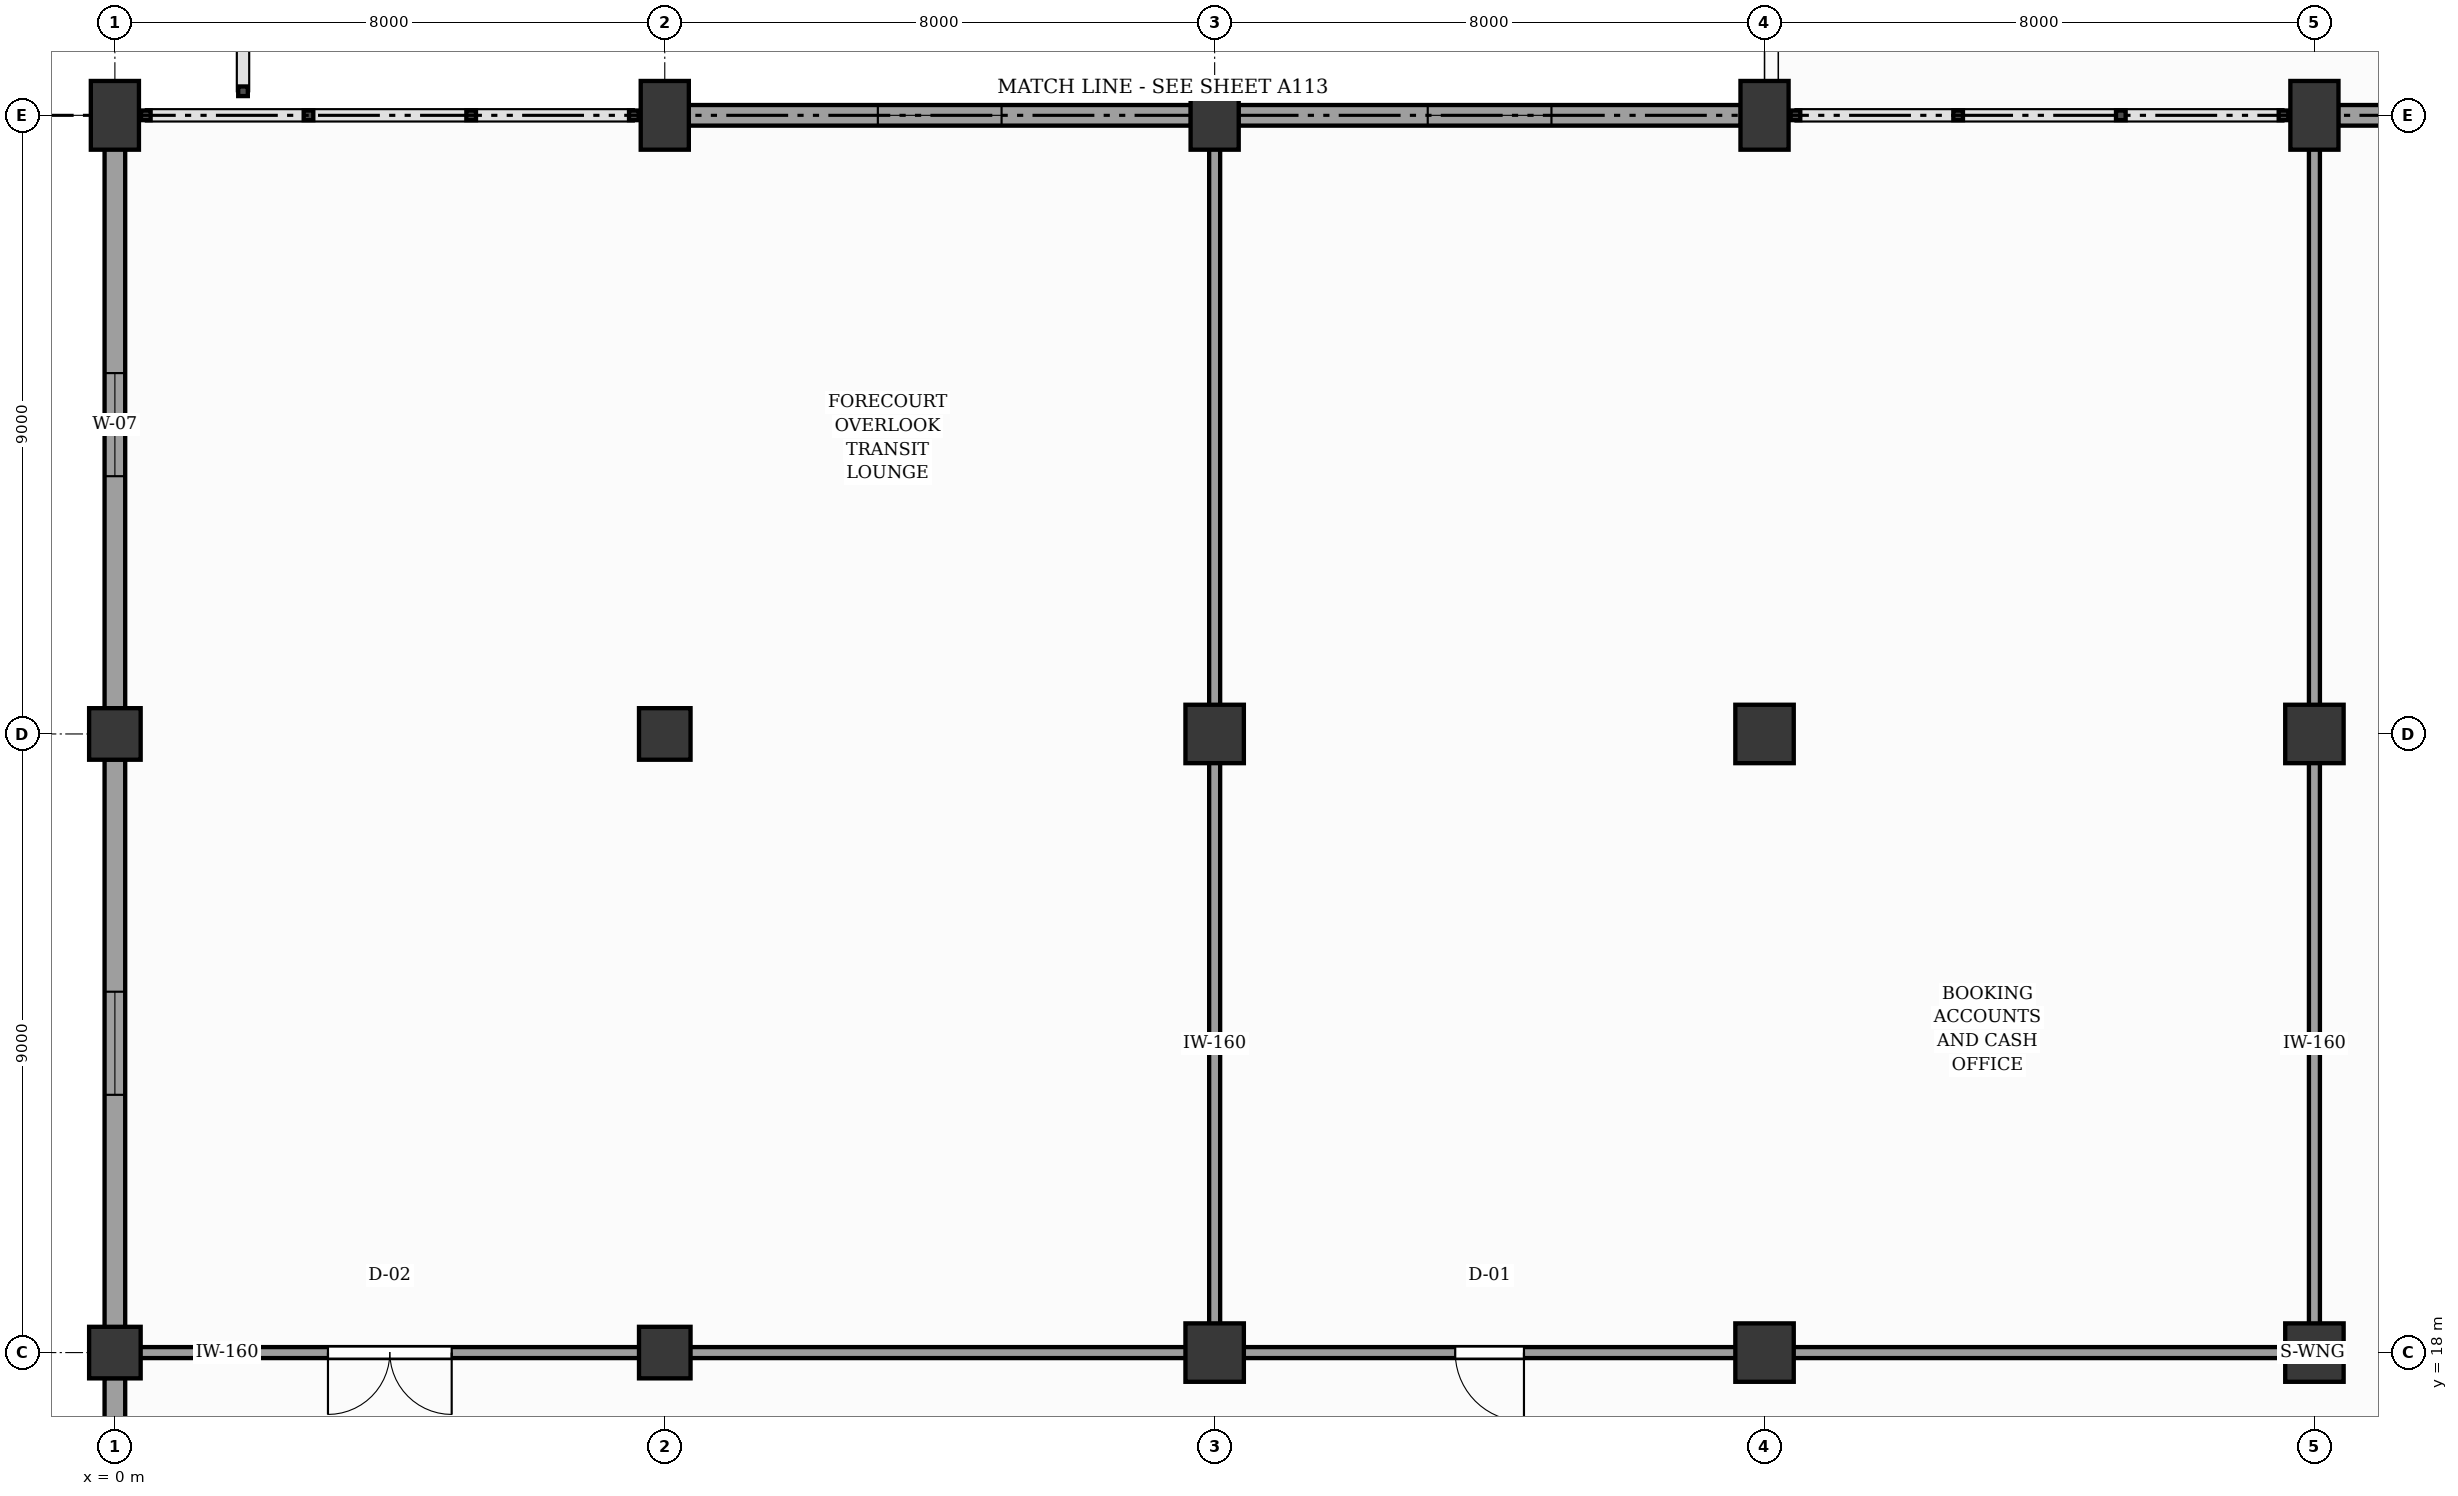
"""IFC4 building model, lengths in metres.
Left out: names, types, materials, properties, quantities, classifications, styles, units other than length and angle.
Written with IfcOpenShell. Run it as: python <this file> out.ifc"""

import sys

from ifc_helpers import new_model, si_unit, direction, frame, frame_2d, origin, origin_2d, place, context, subcontext, project, spatial, rectangle, extrude, element, fill, save


model = new_model("IFC4")
c1 = context("Model", 3, precision=1e-05, world=origin(), true_north=direction((0.0, 1.0)))
c2 = subcontext(c1, "Body", "Model", "MODEL_VIEW")
j1 = project(units=[si_unit("LENGTHUNIT", "METRE"), si_unit("PLANEANGLEUNIT", "RADIAN")], contexts=[c1])
p1 = place(None, origin())
s1 = spatial("IfcSite", under=j1, at=p1, CompositionType="ELEMENT")
p2 = place(p1, origin())
s2 = spatial("IfcBuilding", under=s1, at=p2, CompositionType="ELEMENT")
p3 = place(p2, frame((0.0, 0.0, 4.8)))
s3 = spatial("IfcBuildingStorey", under=s2, at=p3, CompositionType="ELEMENT", Elevation=4.8)
for number, where, z_axis, x_axis in (
    (1, (0.0, 18.0, 0.0), (0.0, 0.0, 1.0), (1.0, 0.0, 0.0)),
    (2, (0.0, 27.0, 0.0), (0.0, 0.0, 1.0), (1.0, 0.0, 0.0)),
):
    element("IfcColumn", number, at=place(p3, frame(where, z_axis=z_axis, x_axis=x_axis)), inside=s3, PredefinedType="COLUMN", context=c2, shape_type="SweptSolid", body=[
        extrude(rectangle(XDim=0.75, YDim=0.75, at=origin_2d()), origin(), (0.0, 0.0, 1.0), 4.8),
    ])
p4 = place(p3, frame((0.0, 36.0, 0.0), z_axis=(0.0, 0.0, 1.0), x_axis=(1.0, 0.0, 0.0)))
e3 = element("IfcColumn", 3, at=p4, inside=s3, PredefinedType="COLUMN", context=c2, shape_type="SweptSolid", body=[
    extrude(rectangle(XDim=0.7, YDim=1.0, at=origin_2d()), origin(), (0.0, 0.0, 1.0), 4.8),
])
for number, where, z_axis, x_axis in (
    (4, (8.0, 18.0, 0.0), (0.0, 0.0, 1.0), (1.0, 0.0, 0.0)),
    (5, (8.0, 27.0, 0.0), (0.0, 0.0, 1.0), (1.0, 0.0, 0.0)),
):
    element("IfcColumn", number, at=place(p3, frame(where, z_axis=z_axis, x_axis=x_axis)), inside=s3, PredefinedType="COLUMN", context=c2, shape_type="SweptSolid", body=[
        extrude(rectangle(XDim=0.75, YDim=0.75, at=origin_2d()), origin(), (0.0, 0.0, 1.0), 4.8),
    ])
p5 = place(p3, frame((8.0, 36.0, 0.0), z_axis=(0.0, 0.0, 1.0), x_axis=(1.0, 0.0, 0.0)))
e6 = element("IfcColumn", 6, at=p5, inside=s3, PredefinedType="COLUMN", context=c2, shape_type="SweptSolid", body=[
    extrude(rectangle(XDim=0.7, YDim=1.0, at=origin_2d()), origin(), (0.0, 0.0, 1.0), 4.8),
])
for number, where, z_axis, x_axis in (
    (7, (16.0, 18.0, 0.0), (0.0, 0.0, 1.0), (1.0, 0.0, 0.0)),
    (8, (16.0, 27.0, 0.0), (0.0, 0.0, 1.0), (1.0, 0.0, 0.0)),
):
    element("IfcColumn", number, at=place(p3, frame(where, z_axis=z_axis, x_axis=x_axis)), inside=s3, PredefinedType="COLUMN", context=c2, shape_type="SweptSolid", body=[
        extrude(rectangle(XDim=0.85, YDim=0.85, at=origin_2d()), origin(), (0.0, 0.0, 1.0), 4.8),
    ])
p6 = place(p3, frame((16.0, 36.0, 0.0), z_axis=(0.0, 0.0, 1.0), x_axis=(1.0, 0.0, 0.0)))
e9 = element("IfcColumn", 9, at=p6, inside=s3, PredefinedType="COLUMN", context=c2, shape_type="SweptSolid", body=[
    extrude(rectangle(XDim=0.7, YDim=1.0, at=origin_2d()), origin(), (0.0, 0.0, 1.0), 4.8),
])
for number, where, z_axis, x_axis in (
    (10, (24.0, 18.0, 0.0), (0.0, 0.0, 1.0), (1.0, 0.0, 0.0)),
    (11, (24.0, 27.0, 0.0), (0.0, 0.0, 1.0), (1.0, 0.0, 0.0)),
):
    element("IfcColumn", number, at=place(p3, frame(where, z_axis=z_axis, x_axis=x_axis)), inside=s3, PredefinedType="COLUMN", context=c2, shape_type="SweptSolid", body=[
        extrude(rectangle(XDim=0.85, YDim=0.85, at=origin_2d()), origin(), (0.0, 0.0, 1.0), 4.8),
    ])
p7 = place(p3, frame((24.0, 36.0, 0.0), z_axis=(0.0, 0.0, 1.0), x_axis=(1.0, 0.0, 0.0)))
e12 = element("IfcColumn", 12, at=p7, inside=s3, PredefinedType="COLUMN", context=c2, shape_type="SweptSolid", body=[
    extrude(rectangle(XDim=0.7, YDim=1.0, at=origin_2d()), origin(), (0.0, 0.0, 1.0), 4.8),
])
for number, where, z_axis, x_axis in (
    (13, (32.0, 18.0, 0.0), (0.0, 0.0, 1.0), (1.0, 0.0, 0.0)),
    (14, (32.0, 27.0, 0.0), (0.0, 0.0, 1.0), (1.0, 0.0, 0.0)),
):
    element("IfcColumn", number, at=place(p3, frame(where, z_axis=z_axis, x_axis=x_axis)), inside=s3, PredefinedType="COLUMN", context=c2, shape_type="SweptSolid", body=[
        extrude(rectangle(XDim=0.85, YDim=0.85, at=origin_2d()), origin(), (0.0, 0.0, 1.0), 4.8),
    ])
p8 = place(p3, frame((32.0, 36.0, 0.0), z_axis=(0.0, 0.0, 1.0), x_axis=(1.0, 0.0, 0.0)))
e15 = element("IfcColumn", 15, at=p8, inside=s3, PredefinedType="COLUMN", context=c2, shape_type="SweptSolid", body=[
    extrude(rectangle(XDim=0.7, YDim=1.0, at=origin_2d()), origin(), (0.0, 0.0, 1.0), 4.8),
])
p9 = place(p3, frame((8.345, 36.0, 0.0), z_axis=(0.0, 0.0, 1.0), x_axis=(1.0, 0.0, 0.0)))
e16 = element("IfcWall", 16, at=p9, inside=s3, PredefinedType="SOLIDWALL", context=c2, shape_type="SweptSolid", body=[
    extrude(rectangle(XDim=7.31, YDim=0.3, at=frame_2d((3.655, 0.0))), origin(), (0.0, 0.0, 1.0), 2.17),
])
p10 = place(p9, frame((2.755, 0.0, 0.95)))
e17 = element("IfcOpeningElement", 17, at=p10, cuts=e16, PredefinedType="OPENING", context=c2, shape_type="SweptSolid", body=[
    extrude(rectangle(XDim=1.8, YDim=1.08, at=frame_2d((0.9, 0.54))), frame((0.0, 0.16, 0.0), z_axis=(0.0, -1.0, 0.0), x_axis=(1.0, 0.0, 0.0)), (0.0, 0.0, 1.0), 0.32),
])
p11 = place(p3, frame((16.345, 36.0, 0.0), z_axis=(0.0, 0.0, 1.0), x_axis=(1.0, 0.0, 0.0)))
e18 = element("IfcWall", 18, at=p11, inside=s3, PredefinedType="SOLIDWALL", context=c2, shape_type="SweptSolid", body=[
    extrude(rectangle(XDim=7.31, YDim=0.3, at=frame_2d((3.655, 0.0))), origin(), (0.0, 0.0, 1.0), 2.17),
])
p12 = place(p11, frame((2.755, 0.0, 0.95)))
e19 = element("IfcOpeningElement", 19, at=p12, cuts=e18, PredefinedType="OPENING", context=c2, shape_type="SweptSolid", body=[
    extrude(rectangle(XDim=1.8, YDim=1.08, at=frame_2d((0.9, 0.54))), frame((0.0, 0.16, 0.0), z_axis=(0.0, -1.0, 0.0), x_axis=(1.0, 0.0, 0.0)), (0.0, 0.0, 1.0), 0.32),
])
p13 = place(p3, frame((32.345, 36.0, 0.0), z_axis=(0.0, 0.0, 1.0), x_axis=(1.0, 0.0, 0.0)))
e20 = element("IfcWall", 20, at=p13, inside=s3, PredefinedType="SOLIDWALL", context=c2, shape_type="SweptSolid", body=[
    extrude(rectangle(XDim=7.31, YDim=0.3, at=frame_2d((3.655, 0.0))), origin(), (0.0, 0.0, 1.0), 3.31),
])
p14 = place(p13, frame((2.855, 0.0, 0.0)))
e21 = element("IfcOpeningElement", 21, at=p14, cuts=e20, PredefinedType="OPENING", context=c2, shape_type="SweptSolid", body=[
    extrude(rectangle(XDim=1.6, YDim=2.15, at=frame_2d((0.8, 1.075))), frame((0.0, 0.16, 0.0), z_axis=(0.0, -1.0, 0.0), x_axis=(1.0, 0.0, 0.0)), (0.0, 0.0, 1.0), 0.32),
])
p15 = place(p3, frame((0.0, 9.37, 0.0), z_axis=(0.0, 0.0, 1.0), x_axis=(0.0, 1.0, 0.0)))
e22 = element("IfcWall", 22, at=p15, inside=s3, PredefinedType="SOLIDWALL", context=c2, shape_type="SweptSolid", body=[
    extrude(rectangle(XDim=8.26, YDim=0.3, at=frame_2d((4.13, 0.0))), origin(), (0.0, 0.0, 1.0), 3.66),
])
p16 = place(p15, frame((3.38, 0.0, 0.95)))
e23 = element("IfcOpeningElement", 23, at=p16, cuts=e22, PredefinedType="OPENING", context=c2, shape_type="SweptSolid", body=[
    extrude(rectangle(XDim=1.5, YDim=1.9, at=frame_2d((0.75, 0.95))), frame((0.0, 0.16, 0.0), z_axis=(0.0, -1.0, 0.0), x_axis=(1.0, 0.0, 0.0)), (0.0, 0.0, 1.0), 0.32),
])
p17 = place(p3, frame((0.0, 18.37, 0.0), z_axis=(0.0, 0.0, 1.0), x_axis=(0.0, 1.0, 0.0)))
e24 = element("IfcWall", 24, at=p17, inside=s3, PredefinedType="SOLIDWALL", context=c2, shape_type="SweptSolid", body=[
    extrude(rectangle(XDim=8.26, YDim=0.3, at=frame_2d((4.13, 0.0))), origin(), (0.0, 0.0, 1.0), 3.66),
])
p18 = place(p17, frame((3.38, 0.0, 0.95)))
e25 = element("IfcOpeningElement", 25, at=p18, cuts=e24, PredefinedType="OPENING", context=c2, shape_type="SweptSolid", body=[
    extrude(rectangle(XDim=1.5, YDim=1.9, at=frame_2d((0.75, 0.95))), frame((0.0, 0.16, 0.0), z_axis=(0.0, -1.0, 0.0), x_axis=(1.0, 0.0, 0.0)), (0.0, 0.0, 1.0), 0.32),
])
p19 = place(p3, frame((0.0, 27.37, 0.0), z_axis=(0.0, 0.0, 1.0), x_axis=(0.0, 1.0, 0.0)))
e26 = element("IfcWall", 26, at=p19, inside=s3, PredefinedType="SOLIDWALL", context=c2, shape_type="SweptSolid", body=[
    extrude(rectangle(XDim=8.23, YDim=0.3, at=frame_2d((4.115, 0.0))), origin(), (0.0, 0.0, 1.0), 3.31),
])
p20 = place(p19, frame((3.38, 0.0, 0.95)))
e27 = element("IfcOpeningElement", 27, at=p20, cuts=e26, PredefinedType="OPENING", context=c2, shape_type="SweptSolid", body=[
    extrude(rectangle(XDim=1.5, YDim=1.9, at=frame_2d((0.75, 0.95))), frame((0.0, 0.16, 0.0), z_axis=(0.0, -1.0, 0.0), x_axis=(1.0, 0.0, 0.0)), (0.0, 0.0, 1.0), 0.32),
])
p21 = place(p3, frame((0.3, 18.0, 0.0), z_axis=(0.0, 0.0, 1.0), x_axis=(1.0, 0.0, 0.0)))
e28 = element("IfcWall", 28, at=p21, inside=s3, PredefinedType="PARTITIONING", context=c2, shape_type="SweptSolid", body=[
    extrude(rectangle(XDim=7.4, YDim=0.16, at=frame_2d((3.7, 0.0))), origin(), (0.0, 0.0, 1.0), 3.66),
])
p22 = place(p21, frame((2.8, 0.0, 0.0)))
e29 = element("IfcOpeningElement", 29, at=p22, cuts=e28, PredefinedType="OPENING", context=c2, shape_type="SweptSolid", body=[
    extrude(rectangle(XDim=1.8, YDim=2.25, at=frame_2d((0.9, 1.125))), frame((0.0, 0.09, 0.0), z_axis=(0.0, -1.0, 0.0), x_axis=(1.0, 0.0, 0.0)), (0.0, 0.0, 1.0), 0.18),
])
p23 = place(p3, frame((8.3, 18.0, 0.0), z_axis=(0.0, 0.0, 1.0), x_axis=(1.0, 0.0, 0.0)))
e30 = element("IfcWall", 30, at=p23, inside=s3, PredefinedType="PARTITIONING", context=c2, shape_type="SweptSolid", body=[
    extrude(rectangle(XDim=7.4, YDim=0.16, at=frame_2d((3.7, 0.0))), origin(), (0.0, 0.0, 1.0), 3.66),
])
p24 = place(p3, frame((16.0, 18.3, 0.0), z_axis=(0.0, 0.0, 1.0), x_axis=(0.0, 1.0, 0.0)))
e31 = element("IfcWall", 31, at=p24, inside=s3, PredefinedType="PARTITIONING", context=c2, shape_type="SweptSolid", body=[
    extrude(rectangle(XDim=8.4, YDim=0.16, at=frame_2d((4.2, 0.0))), origin(), (0.0, 0.0, 1.0), 3.66),
])
p25 = place(p3, frame((16.0, 27.3, 0.0), z_axis=(0.0, 0.0, 1.0), x_axis=(0.0, 1.0, 0.0)))
e32 = element("IfcWall", 32, at=p25, inside=s3, PredefinedType="PARTITIONING", context=c2, shape_type="SweptSolid", body=[
    extrude(rectangle(XDim=8.4, YDim=0.16, at=frame_2d((4.2, 0.0))), origin(), (0.0, 0.0, 1.0), 3.31),
])
p26 = place(p3, frame((16.3, 18.0, 0.0), z_axis=(0.0, 0.0, 1.0), x_axis=(1.0, 0.0, 0.0)))
e33 = element("IfcWall", 33, at=p26, inside=s3, PredefinedType="PARTITIONING", context=c2, shape_type="SweptSolid", body=[
    extrude(rectangle(XDim=7.4, YDim=0.16, at=frame_2d((3.7, 0.0))), origin(), (0.0, 0.0, 1.0), 3.66),
])
p27 = place(p26, frame((3.2, 0.0, 0.0)))
e34 = element("IfcOpeningElement", 34, at=p27, cuts=e33, PredefinedType="OPENING", context=c2, shape_type="SweptSolid", body=[
    extrude(rectangle(XDim=1.0, YDim=2.1, at=frame_2d((0.5, 1.05))), frame((0.0, 0.09, 0.0), z_axis=(0.0, -1.0, 0.0), x_axis=(1.0, 0.0, 0.0)), (0.0, 0.0, 1.0), 0.18),
])
p28 = place(p3, frame((24.3, 18.0, 0.0), z_axis=(0.0, 0.0, 1.0), x_axis=(1.0, 0.0, 0.0)))
e35 = element("IfcWall", 35, at=p28, inside=s3, PredefinedType="PARTITIONING", context=c2, shape_type="SweptSolid", body=[
    extrude(rectangle(XDim=7.4, YDim=0.16, at=frame_2d((3.7, 0.0))), origin(), (0.0, 0.0, 1.0), 3.66),
])
p29 = place(p3, frame((32.0, 18.3, 0.0), z_axis=(0.0, 0.0, 1.0), x_axis=(0.0, 1.0, 0.0)))
e36 = element("IfcWall", 36, at=p29, inside=s3, PredefinedType="PARTITIONING", context=c2, shape_type="SweptSolid", body=[
    extrude(rectangle(XDim=8.4, YDim=0.16, at=frame_2d((4.2, 0.0))), origin(), (0.0, 0.0, 1.0), 3.66),
])
p30 = place(p3, frame((32.0, 27.3, 0.0), z_axis=(0.0, 0.0, 1.0), x_axis=(0.0, 1.0, 0.0)))
e37 = element("IfcWall", 37, at=p30, inside=s3, PredefinedType="PARTITIONING", context=c2, shape_type="SweptSolid", body=[
    extrude(rectangle(XDim=8.4, YDim=0.16, at=frame_2d((4.2, 0.0))), origin(), (0.0, 0.0, 1.0), 3.31),
])
p31 = place(p10, origin())
e38 = element("IfcWindow", 38, at=p31, inside=s3, PartitioningType="SINGLE_PANEL", PredefinedType="WINDOW", context=c2, shape_type="SweptSolid", body=[
    extrude(rectangle(XDim=1.8, YDim=1.08, at=frame_2d((0.9, 0.54))), frame((0.0, 0.03, 0.0), z_axis=(0.0, -1.0, 0.0), x_axis=(1.0, 0.0, 0.0)), (0.0, 0.0, 1.0), 0.06),
])
fill(e17, e38)
p32 = place(p12, origin())
e39 = element("IfcWindow", 39, at=p32, inside=s3, PartitioningType="SINGLE_PANEL", PredefinedType="WINDOW", context=c2, shape_type="SweptSolid", body=[
    extrude(rectangle(XDim=1.8, YDim=1.08, at=frame_2d((0.9, 0.54))), frame((0.0, 0.03, 0.0), z_axis=(0.0, -1.0, 0.0), x_axis=(1.0, 0.0, 0.0)), (0.0, 0.0, 1.0), 0.06),
])
fill(e19, e39)
p33 = place(p18, origin())
e40 = element("IfcWindow", 40, at=p33, inside=s3, PartitioningType="SINGLE_PANEL", PredefinedType="WINDOW", context=c2, shape_type="SweptSolid", body=[
    extrude(rectangle(XDim=1.5, YDim=1.9, at=frame_2d((0.75, 0.95))), frame((0.0, 0.03, 0.0), z_axis=(0.0, -1.0, 0.0), x_axis=(1.0, 0.0, 0.0)), (0.0, 0.0, 1.0), 0.06),
])
fill(e25, e40)
p34 = place(p20, origin())
e41 = element("IfcWindow", 41, at=p34, inside=s3, PartitioningType="SINGLE_PANEL", PredefinedType="WINDOW", context=c2, shape_type="SweptSolid", body=[
    extrude(rectangle(XDim=1.5, YDim=1.9, at=frame_2d((0.75, 0.95))), frame((0.0, 0.03, 0.0), z_axis=(0.0, -1.0, 0.0), x_axis=(1.0, 0.0, 0.0)), (0.0, 0.0, 1.0), 0.06),
])
fill(e27, e41)
p35 = place(p22, frame((1.8, 0.0, 0.0), z_axis=(0.0, 0.0, 1.0), x_axis=(-1.0, 0.0, 0.0)))
e42 = element("IfcDoor", 42, at=p35, inside=s3, OperationType="DOUBLE_DOOR_SINGLE_SWING", PredefinedType="DOOR", context=c2, shape_type="SweptSolid", body=[
    extrude(rectangle(XDim=1.8, YDim=2.25, at=frame_2d((0.9, 1.125))), frame((0.0, 0.025, 0.0), z_axis=(0.0, -1.0, 0.0), x_axis=(1.0, 0.0, 0.0)), (0.0, 0.0, 1.0), 0.05),
])
fill(e29, e42)
p36 = place(p27, frame((1.0, 0.0, 0.0), z_axis=(0.0, 0.0, 1.0), x_axis=(-1.0, 0.0, 0.0)))
e43 = element("IfcDoor", 43, at=p36, inside=s3, OperationType="SINGLE_SWING_RIGHT", PredefinedType="DOOR", context=c2, shape_type="SweptSolid", body=[
    extrude(rectangle(XDim=1.0, YDim=2.1, at=frame_2d((0.5, 1.05))), frame((0.0, 0.025, 0.0), z_axis=(0.0, -1.0, 0.0), x_axis=(1.0, 0.0, 0.0)), (0.0, 0.0, 1.0), 0.05),
])
fill(e34, e43)
save(model, sys.argv[1])
